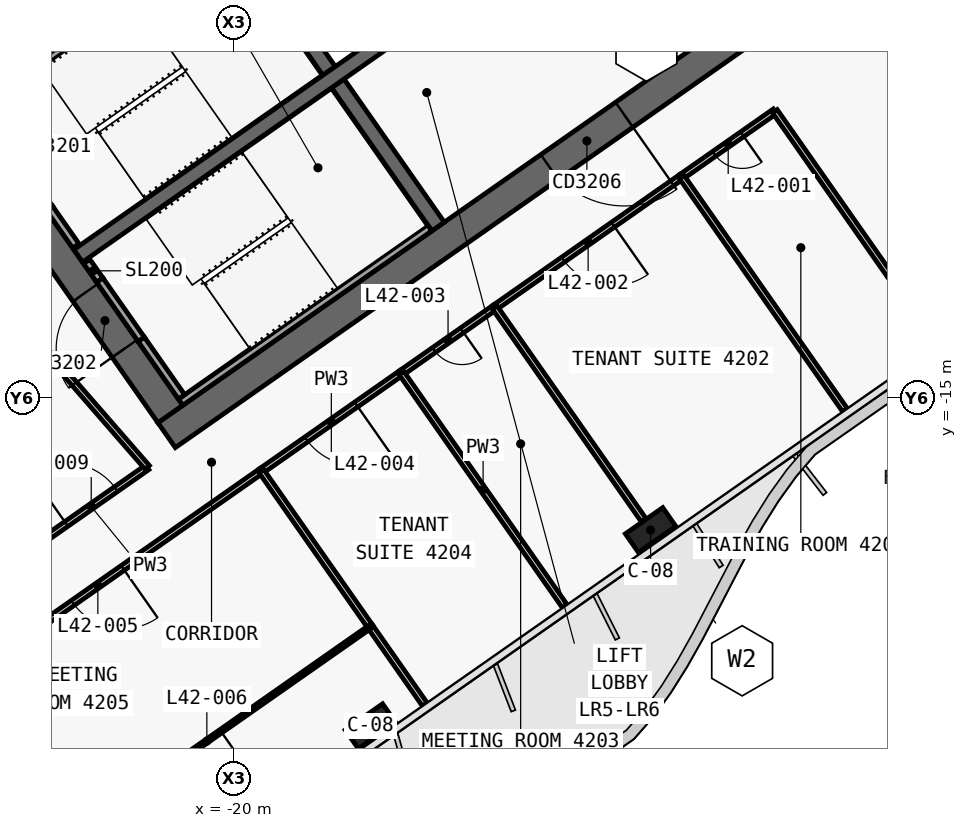
"""IFC4 building model, lengths in metres.
Left out: names, types, materials, properties, quantities, classifications, styles, units other than length and angle.
Written with IfcOpenShell. Run it as: python <this file> out.ifc"""

import sys

from ifc_helpers import new_model, si_unit, direction, frame, frame_2d, origin, origin_2d, place, context, subcontext, project, spatial, polyline, rectangle, outline, extrude, element, fill, save


model = new_model("IFC4")
c1 = context("Model", 3, precision=1e-05, world=origin(), true_north=direction((0.0, 1.0)))
c2 = subcontext(c1, "Body", "Model", "MODEL_VIEW")
j1 = project(units=[si_unit("LENGTHUNIT", "METRE"), si_unit("PLANEANGLEUNIT", "RADIAN")], contexts=[c1])
p1 = place(None, origin())
s1 = spatial("IfcSite", under=j1, at=p1, CompositionType="ELEMENT")
p2 = place(p1, origin())
s2 = spatial("IfcBuilding", under=s1, at=p2, CompositionType="ELEMENT")
p3 = place(p2, frame((0.0, 0.0, 182.7)))
s3 = spatial("IfcBuildingStorey", under=s2, at=p3, CompositionType="ELEMENT", Elevation=182.7)
p4 = place(p3, frame((0.029, 11.984, 0.0), z_axis=(0.0, 0.0, 1.0), x_axis=(-0.819151382952, -0.573577380837, 0.0)))
e1 = element("IfcWall", 1, at=p4, inside=s3, PredefinedType="SHEAR", context=c2, shape_type="SweptSolid", body=[
    extrude(outline(polyline([(33.898, 0.4), (0.56, 0.4), (-0.0, -0.4), (33.898, -0.4), (33.898, 0.4)])), origin(), (0.0, 0.0, 1.0), 3.9),
])
p5 = place(p3, frame((0.029, -0.712, 0.0), z_axis=(0.0, 0.0, 1.0), x_axis=(-0.819151758019, -0.573576845187, 0.0)))
e2 = element("IfcWall", 2, at=p5, inside=s3, PredefinedType="SHEAR", context=c2, shape_type="SweptSolid", body=[
    extrude(outline(polyline([(26.616, 0.4), (0.56, 0.4), (-0.0, -0.4), (26.616, -0.4), (26.616, 0.4)])), origin(), (0.0, 0.0, 1.0), 3.9),
])
p6 = place(p5, frame((2.966, 0.0, 0.0)))
e3 = element("IfcOpeningElement", 3, at=p6, cuts=e2, PredefinedType="OPENING", context=c2, shape_type="SweptSolid", body=[
    extrude(rectangle(XDim=2.4, YDim=2.1, at=frame_2d((1.2, 1.05))), frame((0.0, 0.41, 0.0), z_axis=(0.0, -1.0, 0.0), x_axis=(1.0, 0.0, 0.0)), (0.0, 0.0, 1.0), 0.82),
])
p7 = place(p5, frame((11.916, 0.0, 0.0)))
e4 = element("IfcOpeningElement", 4, at=p7, cuts=e2, PredefinedType="OPENING", context=c2, shape_type="SweptSolid", body=[
    extrude(rectangle(XDim=2.4, YDim=2.1, at=frame_2d((1.2, 1.05))), frame((0.0, 0.41, 0.0), z_axis=(0.0, -1.0, 0.0), x_axis=(1.0, 0.0, 0.0)), (0.0, 0.0, 1.0), 0.82),
])
p8 = place(p3, frame((-21.675, -15.421, 0.0), z_axis=(0.0, 0.0, 1.0), x_axis=(-0.573581815061, 0.819148278049, 0.0)))
e5 = element("IfcWall", 5, at=p8, inside=s3, PredefinedType="SHEAR", context=c2, shape_type="SweptSolid", body=[
    extrude(outline(polyline([(0.0, 0.4), (0.0, -0.4), (9.6, -0.4), (9.6, 0.4), (0.0, 0.4)])), origin(), (0.0, 0.0, 1.0), 3.9),
])
p9 = place(p8, frame((6.3, 0.0, 0.0)))
e6 = element("IfcOpeningElement", 6, at=p9, cuts=e5, PredefinedType="OPENING", context=c2, shape_type="SweptSolid", body=[
    extrude(rectangle(XDim=1.8, YDim=2.1, at=frame_2d((0.9, 1.05))), frame((0.0, 0.41, 0.0), z_axis=(0.0, -1.0, 0.0), x_axis=(1.0, 0.0, 0.0)), (0.0, 0.0, 1.0), 0.82),
])
p10 = place(p8, frame((2.1, 0.0, 0.0)))
e7 = element("IfcOpeningElement", 7, at=p10, cuts=e5, PredefinedType="OPENING", context=c2, shape_type="SweptSolid", body=[
    extrude(rectangle(XDim=1.8, YDim=2.1, at=frame_2d((0.9, 1.05))), frame((0.0, 0.41, 0.0), z_axis=(0.0, -1.0, 0.0), x_axis=(1.0, 0.0, 0.0)), (0.0, 0.0, 1.0), 0.82),
])
p11 = place(p3, frame((-14.63, -10.488, 0.0), z_axis=(0.0, 0.0, 1.0), x_axis=(-0.573611936273, 0.819127185829, 0.0)))
e8 = element("IfcWall", 8, at=p11, inside=s3, PredefinedType="SHEAR", context=c2, shape_type="SweptSolid", body=[
    extrude(outline(polyline([(4.6, 0.2), (0.0, 0.2), (0.0, -0.2), (4.6, -0.2), (4.6, 0.2)])), origin(), (0.0, 0.0, 1.0), 3.9),
])
p12 = place(p3, frame((-17.498, -6.392, 0.0), z_axis=(0.0, 0.0, 1.0), x_axis=(-0.573611936273, 0.819127185829, 0.0)))
e9 = element("IfcWall", 9, at=p12, inside=s3, PredefinedType="SHEAR", context=c2, shape_type="SweptSolid", body=[
    extrude(outline(polyline([(4.6, -0.2), (4.6, 0.2), (0.0, 0.2), (0.0, -0.2), (4.6, -0.2)])), origin(), (0.0, 0.0, 1.0), 3.9),
])
p13 = place(p3, frame((-2.638, 3.768, 0.0), z_axis=(0.0, 0.0, 1.0), x_axis=(-0.81915267502, -0.573575535572, 0.0)))
e10 = element("IfcWall", 10, at=p13, inside=s3, PredefinedType="SHEAR", context=c2, shape_type="SweptSolid", body=[
    extrude(outline(polyline([(26.2, 0.2), (0.0, 0.2), (0.0, -0.2), (26.2, -0.2), (26.2, 0.2)])), origin(), (0.0, 0.0, 1.0), 3.9),
])
p14 = place(p13, frame((1.169, 0.0, 0.0)))
e11 = element("IfcOpeningElement", 11, at=p14, cuts=e10, PredefinedType="OPENING", context=c2, shape_type="SweptSolid", body=[
    extrude(rectangle(XDim=1.1, YDim=2.1, at=frame_2d((0.55, 1.05))), frame((0.0, 0.21, 0.0), z_axis=(0.0, -1.0, 0.0), x_axis=(1.0, 0.0, 0.0)), (0.0, 0.0, 1.0), 0.42),
])
p15 = place(p13, frame((3.206, 0.0, 0.0)))
e12 = element("IfcOpeningElement", 12, at=p15, cuts=e10, PredefinedType="OPENING", context=c2, shape_type="SweptSolid", body=[
    extrude(rectangle(XDim=1.1, YDim=2.1, at=frame_2d((0.55, 1.05))), frame((0.0, 0.21, 0.0), z_axis=(0.0, -1.0, 0.0), x_axis=(1.0, 0.0, 0.0)), (0.0, 0.0, 1.0), 0.42),
])
p16 = place(p13, frame((5.244, 0.0, 0.0)))
e13 = element("IfcOpeningElement", 13, at=p16, cuts=e10, PredefinedType="OPENING", context=c2, shape_type="SweptSolid", body=[
    extrude(rectangle(XDim=1.1, YDim=2.1, at=frame_2d((0.55, 1.05))), frame((0.0, 0.21, 0.0), z_axis=(0.0, -1.0, 0.0), x_axis=(1.0, 0.0, 0.0)), (0.0, 0.0, 1.0), 0.42),
])
p17 = place(p13, frame((7.281, 0.0, 0.0)))
e14 = element("IfcOpeningElement", 14, at=p17, cuts=e10, PredefinedType="OPENING", context=c2, shape_type="SweptSolid", body=[
    extrude(rectangle(XDim=1.1, YDim=2.1, at=frame_2d((0.55, 1.05))), frame((0.0, 0.21, 0.0), z_axis=(0.0, -1.0, 0.0), x_axis=(1.0, 0.0, 0.0)), (0.0, 0.0, 1.0), 0.42),
])
p18 = place(p13, frame((9.688, 0.0, 0.0)))
e15 = element("IfcOpeningElement", 15, at=p18, cuts=e10, PredefinedType="OPENING", context=c2, shape_type="SweptSolid", body=[
    extrude(rectangle(XDim=1.1, YDim=2.1, at=frame_2d((0.55, 1.05))), frame((0.0, 0.21, 0.0), z_axis=(0.0, -1.0, 0.0), x_axis=(1.0, 0.0, 0.0)), (0.0, 0.0, 1.0), 0.42),
])
p19 = place(p13, frame((11.863, 0.0, 0.0)))
e16 = element("IfcOpeningElement", 16, at=p19, cuts=e10, PredefinedType="OPENING", context=c2, shape_type="SweptSolid", body=[
    extrude(rectangle(XDim=1.1, YDim=2.1, at=frame_2d((0.55, 1.05))), frame((0.0, 0.21, 0.0), z_axis=(0.0, -1.0, 0.0), x_axis=(1.0, 0.0, 0.0)), (0.0, 0.0, 1.0), 0.42),
])
for number, where, z_axis, x_axis in (
    (17, (-9.038, -18.475, 0.0), (0.0, 0.0, 1.0), (-0.819, -0.574, 0.0)),
    (18, (-16.41, -23.637, 0.0), (0.0, 0.0, 1.0), (-0.819, -0.574, 0.0)),
):
    element("IfcColumn", number, at=place(p3, frame(where, z_axis=z_axis, x_axis=x_axis)), inside=s3, PredefinedType="COLUMN", context=c2, shape_type="SweptSolid", body=[
        extrude(rectangle(XDim=1.2, YDim=0.6, at=origin_2d()), origin(), (0.0, 0.0, 1.0), 3.9),
    ])
p20 = place(p3, frame((-20.243, -2.821, 0.0), z_axis=(0.0, 0.0, 1.0), x_axis=(-0.819141584393, -0.57359137434, 0.0)))
e19 = element("IfcWall", 19, at=p20, inside=s3, PredefinedType="SOLIDWALL", context=c2, shape_type="SweptSolid", body=[
    extrude(rectangle(XDim=8.0, YDim=0.2, at=frame_2d((4.0, 0.0))), origin(), (0.0, 0.0, 1.0), 3.62),
])
p21 = place(p3, frame((-24.162, -10.998, 0.0), z_axis=(0.0, 0.0, 1.0), x_axis=(-0.573612502218, 0.819126789514, 0.0)))
e20 = element("IfcWall", 20, at=p21, inside=s3, PredefinedType="SOLIDWALL", context=c2, shape_type="SweptSolid", body=[
    extrude(rectangle(XDim=1.2, YDim=0.2, at=frame_2d((0.6, 0.0))), origin(), (0.0, 0.0, 1.0), 3.62),
])
p22 = place(p3, frame((-24.85, -10.014, 2.15), z_axis=(0.0, 0.0, 1.0), x_axis=(-0.573505465124, 0.819201734296, 0.0)))
e21 = element("IfcWall", 21, at=p22, inside=s3, PredefinedType="SOLIDWALL", context=c2, shape_type="SweptSolid", body=[
    extrude(rectangle(XDim=1.9, YDim=0.2, at=frame_2d((0.95, 0.0))), origin(), (0.0, 0.0, 1.0), 1.47),
])
p23 = place(p3, frame((-14.851, -10.521, 0.0), z_axis=(0.0, 0.0, 1.0), x_axis=(-0.819141584393, -0.57359137434, 0.0)))
e22 = element("IfcWall", 22, at=p23, inside=s3, PredefinedType="SOLIDWALL", context=c2, shape_type="SweptSolid", body=[
    extrude(rectangle(XDim=8.0, YDim=0.2, at=frame_2d((4.0, 0.0))), origin(), (0.0, 0.0, 1.0), 3.62),
])
p24 = place(p3, frame((-21.38, -14.97, 0.0), z_axis=(0.0, 0.0, 1.0), x_axis=(-0.573559770908, 0.819163713305, 0.0)))
e23 = element("IfcWall", 23, at=p24, inside=s3, PredefinedType="SOLIDWALL", context=c2, shape_type="SweptSolid", body=[
    extrude(rectangle(XDim=1.85, YDim=0.2, at=frame_2d((0.925, 0.0))), origin(), (0.0, 0.0, 1.0), 3.62),
])
p25 = place(p3, frame((-23.531, -11.898, 0.0), z_axis=(0.0, 0.0, 1.0), x_axis=(-0.573708088123, 0.819059844958, 0.0)))
e24 = element("IfcWall", 24, at=p25, inside=s3, PredefinedType="SOLIDWALL", context=c2, shape_type="SweptSolid", body=[
    extrude(rectangle(XDim=0.6, YDim=0.2, at=frame_2d((0.3, 0.0))), origin(), (0.0, 0.0, 1.0), 3.62),
])
p26 = place(p3, frame((-22.441, -13.455, 2.15), z_axis=(0.0, 0.0, 1.0), x_axis=(-0.573591692345, 0.819141361715, 0.0)))
e25 = element("IfcWall", 25, at=p26, inside=s3, PredefinedType="SOLIDWALL", context=c2, shape_type="SweptSolid", body=[
    extrude(rectangle(XDim=1.9, YDim=0.2, at=frame_2d((0.95, 0.0))), origin(), (0.0, 0.0, 1.0), 1.47),
])
p27 = place(p3, frame((-25.231, -18.888, 0.0), z_axis=(0.0, 0.0, 1.0), x_axis=(0.819152236293, 0.573576162141, 0.0)))
e26 = element("IfcWall", 26, at=p27, inside=s3, PredefinedType="PARTITIONING", context=c2, shape_type="SweptSolid", body=[
    extrude(rectangle(XDim=3.599, YDim=0.15, at=frame_2d((1.799, 0.0))), origin(), (0.0, 0.0, 1.0), 3.0),
])
p28 = place(p27, frame((1.0, 0.0, 0.0)))
e27 = element("IfcOpeningElement", 27, at=p28, cuts=e26, PredefinedType="OPENING", context=c2, shape_type="SweptSolid", body=[
    extrude(rectangle(XDim=1.6, YDim=2.1, at=frame_2d((0.8, 1.05))), frame((0.0, 0.085, 0.0), z_axis=(0.0, -1.0, 0.0), x_axis=(1.0, 0.0, 0.0)), (0.0, 0.0, 1.0), 0.17),
])
p29 = place(p3, frame((-5.766, -7.456, 0.0), z_axis=(0.0, 0.0, 1.0), x_axis=(-0.819132568355, -0.573604249862, 0.0)))
e28 = element("IfcWall", 28, at=p29, inside=s3, PredefinedType="PARTITIONING", context=c2, shape_type="SweptSolid", body=[
    extrude(rectangle(XDim=3.002, YDim=0.15, at=frame_2d((1.501, 0.0))), origin(), (0.0, 0.0, 1.0), 3.0),
])
p30 = place(p29, frame((1.051, 0.0, 0.0)))
e29 = element("IfcOpeningElement", 29, at=p30, cuts=e28, PredefinedType="OPENING", context=c2, shape_type="SweptSolid", body=[
    extrude(rectangle(XDim=0.9, YDim=2.1, at=frame_2d((0.45, 1.05))), frame((0.0, 0.085, 0.0), z_axis=(0.0, -1.0, 0.0), x_axis=(1.0, 0.0, 0.0)), (0.0, 0.0, 1.0), 0.17),
])
p31 = place(p3, frame((-8.222, -9.175, 0.0), z_axis=(0.0, 0.0, 1.0), x_axis=(-0.819145946981, -0.573585144111, 0.0)))
e30 = element("IfcWall", 30, at=p31, inside=s3, PredefinedType="PARTITIONING", context=c2, shape_type="SweptSolid", body=[
    extrude(rectangle(XDim=6.004, YDim=0.15, at=frame_2d((3.002, 0.0))), origin(), (0.0, 0.0, 1.0), 3.0),
])
p32 = place(p31, frame((2.202, 0.0, 0.0)))
e31 = element("IfcOpeningElement", 31, at=p32, cuts=e30, PredefinedType="OPENING", context=c2, shape_type="SweptSolid", body=[
    extrude(rectangle(XDim=1.6, YDim=2.1, at=frame_2d((0.8, 1.05))), frame((0.0, 0.085, 0.0), z_axis=(0.0, -1.0, 0.0), x_axis=(1.0, 0.0, 0.0)), (0.0, 0.0, 1.0), 0.17),
])
p33 = place(p3, frame((-13.137, -12.617, 0.0), z_axis=(0.0, 0.0, 1.0), x_axis=(-0.81916700466, -0.573555070134, 0.0)))
e32 = element("IfcWall", 32, at=p33, inside=s3, PredefinedType="PARTITIONING", context=c2, shape_type="SweptSolid", body=[
    extrude(rectangle(XDim=3.004, YDim=0.15, at=frame_2d((1.502, 0.0))), origin(), (0.0, 0.0, 1.0), 3.0),
])
p34 = place(p33, frame((1.052, 0.0, 0.0)))
e33 = element("IfcOpeningElement", 33, at=p34, cuts=e32, PredefinedType="OPENING", context=c2, shape_type="SweptSolid", body=[
    extrude(rectangle(XDim=0.9, YDim=2.1, at=frame_2d((0.45, 1.05))), frame((0.0, 0.085, 0.0), z_axis=(0.0, -1.0, 0.0), x_axis=(1.0, 0.0, 0.0)), (0.0, 0.0, 1.0), 0.17),
])
p35 = place(p3, frame((-15.594, -14.338, 0.0), z_axis=(0.0, 0.0, 1.0), x_axis=(-0.819165703328, -0.573556928727, 0.0)))
e34 = element("IfcWall", 34, at=p35, inside=s3, PredefinedType="PARTITIONING", context=c2, shape_type="SweptSolid", body=[
    extrude(rectangle(XDim=4.504, YDim=0.15, at=frame_2d((2.252, 0.0))), origin(), (0.0, 0.0, 1.0), 3.62),
])
p36 = place(p35, frame((1.452, 0.0, 0.0)))
e35 = element("IfcOpeningElement", 35, at=p36, cuts=e34, PredefinedType="OPENING", context=c2, shape_type="SweptSolid", body=[
    extrude(rectangle(XDim=1.6, YDim=2.1, at=frame_2d((0.8, 1.05))), frame((0.0, 0.085, 0.0), z_axis=(0.0, -1.0, 0.0), x_axis=(1.0, 0.0, 0.0)), (0.0, 0.0, 1.0), 0.17),
])
p37 = place(p3, frame((-19.281, -16.919, 0.0), z_axis=(0.0, 0.0, 1.0), x_axis=(-0.819145647741, -0.57358557146, 0.0)))
e36 = element("IfcWall", 36, at=p37, inside=s3, PredefinedType="PARTITIONING", context=c2, shape_type="SweptSolid", body=[
    extrude(rectangle(XDim=10.504, YDim=0.15, at=frame_2d((5.252, 0.0))), origin(), (0.0, 0.0, 1.0), 3.0),
])
p38 = place(p37, frame((4.452, 0.0, 0.0)))
e37 = element("IfcOpeningElement", 37, at=p38, cuts=e36, PredefinedType="OPENING", context=c2, shape_type="SweptSolid", body=[
    extrude(rectangle(XDim=1.6, YDim=2.1, at=frame_2d((0.8, 1.05))), frame((0.0, 0.085, 0.0), z_axis=(0.0, -1.0, 0.0), x_axis=(1.0, 0.0, 0.0)), (0.0, 0.0, 1.0), 0.17),
])
p39 = place(p3, frame((-1.849, -13.051, 0.0), z_axis=(0.0, 0.0, 1.0), x_axis=(-0.57357985571, 0.819149650018, 0.0)))
e38 = element("IfcWall", 38, at=p39, inside=s3, PredefinedType="PARTITIONING", context=c2, shape_type="SweptSolid", body=[
    extrude(rectangle(XDim=6.832, YDim=0.15, at=frame_2d((3.416, 0.0))), origin(), (0.0, 0.0, 1.0), 3.0),
])
p40 = place(p3, frame((-22.284, -16.826, 0.0), z_axis=(0.0, 0.0, 1.0), x_axis=(-0.656758142177, 0.754101281449, 0.0)))
e39 = element("IfcWall", 39, at=p40, inside=s3, PredefinedType="PARTITIONING", context=c2, shape_type="SweptSolid", body=[
    extrude(rectangle(XDim=6.539, YDim=0.15, at=frame_2d((3.269, 0.0))), origin(), (0.0, 0.0, 1.0), 3.0),
])
p41 = place(p3, frame((-3.922, -15.32, 0.0), z_axis=(0.0, 0.0, 1.0), x_axis=(-0.573560650686, 0.819163097304, 0.0)))
e40 = element("IfcWall", 40, at=p41, inside=s3, PredefinedType="PARTITIONING", context=c2, shape_type="SweptSolid", body=[
    extrude(rectangle(XDim=7.5, YDim=0.15, at=frame_2d((3.75, 0.0))), origin(), (0.0, 0.0, 1.0), 2.9),
])
p42 = place(p3, frame((-9.221, -18.213, 0.0), z_axis=(0.0, 0.0, 1.0), x_axis=(-0.573560698343, 0.819163063936, 0.0)))
e41 = element("IfcWall", 41, at=p42, inside=s3, PredefinedType="PARTITIONING", context=c2, shape_type="SweptSolid", body=[
    extrude(rectangle(XDim=6.83, YDim=0.15, at=frame_2d((3.415, 0.0))), origin(), (0.0, 0.0, 1.0), 3.0),
])
p43 = place(p3, frame((-11.294, -20.482, 0.0), z_axis=(0.0, 0.0, 1.0), x_axis=(-0.573560650686, 0.819163097304, 0.0)))
e42 = element("IfcWall", 42, at=p43, inside=s3, PredefinedType="PARTITIONING", context=c2, shape_type="SweptSolid", body=[
    extrude(rectangle(XDim=7.5, YDim=0.15, at=frame_2d((3.75, 0.0))), origin(), (0.0, 0.0, 1.0), 2.9),
])
p44 = place(p3, frame((-14.98, -23.063, 0.0), z_axis=(0.0, 0.0, 1.0), x_axis=(-0.573613022702, 0.819126425033, 0.0)))
e43 = element("IfcWall", 43, at=p44, inside=s3, PredefinedType="PARTITIONING", context=c2, shape_type="SweptSolid", body=[
    extrude(rectangle(XDim=2.501, YDim=0.15, at=frame_2d((1.25, 0.0))), origin(), (0.0, 0.0, 1.0), 2.9),
])
p45 = place(p3, frame((-16.413, -21.017, 0.0), z_axis=(0.0, 0.0, 1.0), x_axis=(-0.573613022702, 0.819126425033, 0.0)))
e44 = element("IfcWall", 44, at=p45, inside=s3, PredefinedType="PARTITIONING", context=c2, shape_type="SweptSolid", body=[
    extrude(rectangle(XDim=5.002, YDim=0.15, at=frame_2d((2.501, 0.0))), origin(), (0.0, 0.0, 1.0), 3.62),
])
p46 = place(p3, frame((-16.414, -21.016, 0.0), z_axis=(0.0, 0.0, 1.0), x_axis=(-0.81914452344, -0.573587177086, 0.0)))
e45 = element("IfcWall", 45, at=p46, inside=s3, PredefinedType="PARTITIONING", context=c2, shape_type="SweptSolid", body=[
    extrude(rectangle(XDim=10.5, YDim=0.1, at=frame_2d((5.25, 0.0))), origin(), (0.0, 0.0, 1.0), 3.0),
])
p47 = place(p46, frame((4.8, 0.0, 0.0)))
e46 = element("IfcOpeningElement", 46, at=p47, cuts=e45, PredefinedType="OPENING", context=c2, shape_type="SweptSolid", body=[
    extrude(rectangle(XDim=0.9, YDim=2.1, at=frame_2d((0.45, 1.05))), frame((0.0, 0.06, 0.0), z_axis=(0.0, -1.0, 0.0), x_axis=(1.0, 0.0, 0.0)), (0.0, 0.0, 1.0), 0.12),
])
p48 = place(p7, origin())
e47 = element("IfcDoor", 47, at=p48, inside=s3, OperationType="DOUBLE_DOOR_SINGLE_SWING", PredefinedType="DOOR", context=c2, shape_type="SweptSolid", body=[
    extrude(rectangle(XDim=2.4, YDim=2.1, at=frame_2d((1.2, 1.05))), frame((0.0, 0.025, 0.0), z_axis=(0.0, -1.0, 0.0), x_axis=(1.0, 0.0, 0.0)), (0.0, 0.0, 1.0), 0.05),
])
fill(e4, e47)
p49 = place(p10, origin())
e48 = element("IfcDoor", 48, at=p49, inside=s3, OperationType="DOUBLE_DOOR_SINGLE_SWING", PredefinedType="DOOR", context=c2, shape_type="SweptSolid", body=[
    extrude(rectangle(XDim=1.8, YDim=2.1, at=frame_2d((0.9, 1.05))), frame((0.0, 0.025, 0.0), z_axis=(0.0, -1.0, 0.0), x_axis=(1.0, 0.0, 0.0)), (0.0, 0.0, 1.0), 0.05),
])
fill(e7, e48)
p50 = place(p30, origin())
e49 = element("IfcDoor", 49, at=p50, inside=s3, OperationType="SINGLE_SWING_RIGHT", PredefinedType="DOOR", context=c2, shape_type="SweptSolid", body=[
    extrude(rectangle(XDim=0.9, YDim=2.1, at=frame_2d((0.45, 1.05))), frame((0.0, 0.025, 0.0), z_axis=(0.0, -1.0, 0.0), x_axis=(1.0, 0.0, 0.0)), (0.0, 0.0, 1.0), 0.05),
])
fill(e29, e49)
p51 = place(p32, origin())
e50 = element("IfcDoor", 50, at=p51, inside=s3, OperationType="DOUBLE_DOOR_SINGLE_SWING", PredefinedType="DOOR", context=c2, shape_type="SweptSolid", body=[
    extrude(rectangle(XDim=1.6, YDim=2.1, at=frame_2d((0.8, 1.05))), frame((0.0, 0.025, 0.0), z_axis=(0.0, -1.0, 0.0), x_axis=(1.0, 0.0, 0.0)), (0.0, 0.0, 1.0), 0.05),
])
fill(e31, e50)
p52 = place(p34, origin())
e51 = element("IfcDoor", 51, at=p52, inside=s3, OperationType="SINGLE_SWING_RIGHT", PredefinedType="DOOR", context=c2, shape_type="SweptSolid", body=[
    extrude(rectangle(XDim=0.9, YDim=2.1, at=frame_2d((0.45, 1.05))), frame((0.0, 0.025, 0.0), z_axis=(0.0, -1.0, 0.0), x_axis=(1.0, 0.0, 0.0)), (0.0, 0.0, 1.0), 0.05),
])
fill(e33, e51)
p53 = place(p36, origin())
e52 = element("IfcDoor", 52, at=p53, inside=s3, OperationType="DOUBLE_DOOR_SINGLE_SWING", PredefinedType="DOOR", context=c2, shape_type="SweptSolid", body=[
    extrude(rectangle(XDim=1.6, YDim=2.1, at=frame_2d((0.8, 1.05))), frame((0.0, 0.025, 0.0), z_axis=(0.0, -1.0, 0.0), x_axis=(1.0, 0.0, 0.0)), (0.0, 0.0, 1.0), 0.05),
])
fill(e35, e52)
p54 = place(p38, origin())
e53 = element("IfcDoor", 53, at=p54, inside=s3, OperationType="DOUBLE_DOOR_SINGLE_SWING", PredefinedType="DOOR", context=c2, shape_type="SweptSolid", body=[
    extrude(rectangle(XDim=1.6, YDim=2.1, at=frame_2d((0.8, 1.05))), frame((0.0, 0.025, 0.0), z_axis=(0.0, -1.0, 0.0), x_axis=(1.0, 0.0, 0.0)), (0.0, 0.0, 1.0), 0.05),
])
fill(e37, e53)
p55 = place(p47, origin())
e54 = element("IfcDoor", 54, at=p55, inside=s3, OperationType="SINGLE_SWING_LEFT", PredefinedType="DOOR", context=c2, shape_type="SweptSolid", body=[
    extrude(rectangle(XDim=0.9, YDim=2.1, at=frame_2d((0.45, 1.05))), frame((0.0, 0.025, 0.0), z_axis=(0.0, -1.0, 0.0), x_axis=(1.0, 0.0, 0.0)), (0.0, 0.0, 1.0), 0.05),
])
fill(e46, e54)
p56 = place(p28, origin())
e55 = element("IfcDoor", 55, at=p56, inside=s3, OperationType="DOUBLE_DOOR_SINGLE_SWING", PredefinedType="DOOR", context=c2, shape_type="SweptSolid", body=[
    extrude(rectangle(XDim=1.6, YDim=2.1, at=frame_2d((0.8, 1.05))), frame((0.0, 0.025, 0.0), z_axis=(0.0, -1.0, 0.0), x_axis=(1.0, 0.0, 0.0)), (0.0, 0.0, 1.0), 0.05),
])
fill(e27, e55)
save(model, sys.argv[1])
